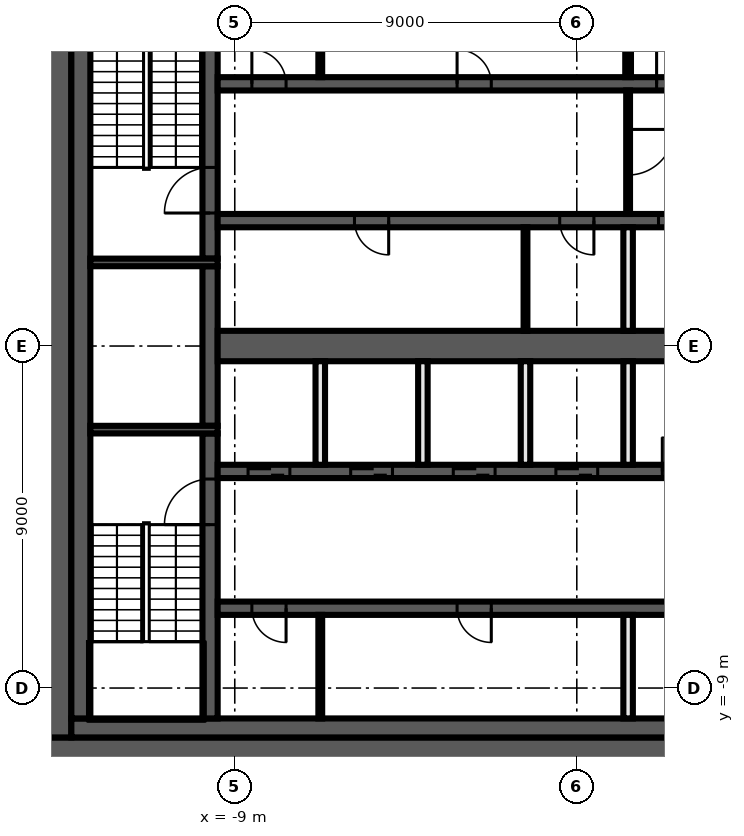
"""IFC4 building model, lengths in metres.
Left out: names, types, materials, properties, quantities, classifications, styles, units other than length and angle.
Written with IfcOpenShell. Run it as: python <this file> out.ifc"""

import sys

from ifc_helpers import new_model, si_unit, direction, frame, frame_2d, origin, place, context, subcontext, project, spatial, rectangle, extrude, element, fill, save


model = new_model("IFC4")
c1 = context("Model", 3, precision=1e-05, world=origin(), true_north=direction((0.0, 1.0)))
c2 = subcontext(c1, "Body", "Model", "MODEL_VIEW")
j1 = project(units=[si_unit("LENGTHUNIT", "METRE"), si_unit("PLANEANGLEUNIT", "RADIAN")], contexts=[c1])
p1 = place(None, origin())
s1 = spatial("IfcSite", under=j1, at=p1, CompositionType="ELEMENT")
p2 = place(p1, origin())
s2 = spatial("IfcBuilding", under=s1, at=p2, CompositionType="ELEMENT")
p3 = place(p2, frame((0.0, 0.0, 262.2)))
s3 = spatial("IfcBuildingStorey", under=s2, at=p3, CompositionType="ELEMENT", Elevation=262.2)
p4 = place(p3, frame((14.0, -10.65, 0.0), z_axis=(0.0, 0.0, 1.0), x_axis=(-1.0, 0.0, 0.0)))
e1 = element("IfcWall", 1, at=p4, inside=s3, PredefinedType="SHEAR", context=c2, shape_type="SweptSolid", body=[
    extrude(rectangle(XDim=28.0, YDim=0.7, at=frame_2d((14.0, 0.0))), origin(), (0.0, 0.0, 1.0), 3.82),
])
p5 = place(p4, frame((5.1, 0.0, 0.0)))
e2 = element("IfcOpeningElement", 2, at=p5, cuts=e1, PredefinedType="OPENING", context=c2, shape_type="SweptSolid", body=[
    extrude(rectangle(XDim=1.6, YDim=2.1, at=frame_2d((0.8, 1.05))), frame((0.0, 0.36, 0.0), z_axis=(0.0, -1.0, 0.0), x_axis=(1.0, 0.0, 0.0)), (0.0, 0.0, 1.0), 0.72),
])
p6 = place(p3, frame((-13.65, -10.3, 0.0), z_axis=(0.0, 0.0, 1.0), x_axis=(0.0, 1.0, 0.0)))
e3 = element("IfcWall", 3, at=p6, inside=s3, PredefinedType="SHEAR", context=c2, shape_type="SweptSolid", body=[
    extrude(rectangle(XDim=20.6, YDim=0.7, at=frame_2d((10.3, 0.0))), origin(), (0.0, 0.0, 1.0), 3.82),
])
p7 = place(p3, frame((6.9, -10.05, 0.0), z_axis=(0.0, 0.0, 1.0), x_axis=(-1.0, 0.0, 0.0)))
e4 = element("IfcWall", 4, at=p7, inside=s3, PredefinedType="SHEAR", context=c2, shape_type="SweptSolid", body=[
    extrude(rectangle(XDim=20.2, YDim=0.5, at=frame_2d((10.1, 0.0))), origin(), (0.0, 0.0, 1.0), 3.82),
])
p8 = place(p3, frame((-13.05, -9.8, 0.0), z_axis=(0.0, 0.0, 1.0), x_axis=(0.0, 1.0, 0.0)))
e5 = element("IfcWall", 5, at=p8, inside=s3, PredefinedType="SHEAR", context=c2, shape_type="SweptSolid", body=[
    extrude(rectangle(XDim=19.6, YDim=0.5, at=frame_2d((9.8, 0.0))), origin(), (0.0, 0.0, 1.0), 3.82),
])
p9 = place(p3, frame((-9.65, -9.8, 0.0), z_axis=(0.0, 0.0, 1.0), x_axis=(0.0, 1.0, 0.0)))
e6 = element("IfcWall", 6, at=p9, inside=s3, PredefinedType="SHEAR", context=c2, shape_type="SweptSolid", body=[
    extrude(rectangle(XDim=7.5, YDim=0.4, at=frame_2d((3.75, 0.0))), origin(), (0.0, 0.0, 1.0), 3.82),
])
p10 = place(p9, frame((5.1, 0.0, 0.0)))
e7 = element("IfcOpeningElement", 7, at=p10, cuts=e6, PredefinedType="OPENING", context=c2, shape_type="SweptSolid", body=[
    extrude(rectangle(XDim=1.2, YDim=2.1, at=frame_2d((0.6, 1.05))), frame((0.0, 0.21, 0.0), z_axis=(0.0, -1.0, 0.0), x_axis=(1.0, 0.0, 0.0)), (0.0, 0.0, 1.0), 0.42),
])
p11 = place(p3, frame((-9.65, -2.1, 0.0), z_axis=(0.0, 0.0, 1.0), x_axis=(0.0, 1.0, 0.0)))
e8 = element("IfcWall", 8, at=p11, inside=s3, PredefinedType="SHEAR", context=c2, shape_type="SweptSolid", body=[
    extrude(rectangle(XDim=4.2, YDim=0.4, at=frame_2d((2.1, 0.0))), origin(), (0.0, 0.0, 1.0), 3.82),
])
p12 = place(p3, frame((-9.65, 2.3, 0.0), z_axis=(0.0, 0.0, 1.0), x_axis=(0.0, 1.0, 0.0)))
e9 = element("IfcWall", 9, at=p12, inside=s3, PredefinedType="SHEAR", context=c2, shape_type="SweptSolid", body=[
    extrude(rectangle(XDim=7.5, YDim=0.4, at=frame_2d((3.75, 0.0))), origin(), (0.0, 0.0, 1.0), 3.82),
])
p13 = place(p12, frame((1.2, 0.0, 0.0)))
e10 = element("IfcOpeningElement", 10, at=p13, cuts=e9, PredefinedType="OPENING", context=c2, shape_type="SweptSolid", body=[
    extrude(rectangle(XDim=1.2, YDim=2.1, at=frame_2d((0.6, 1.05))), frame((0.0, 0.21, 0.0), z_axis=(0.0, -1.0, 0.0), x_axis=(1.0, 0.0, 0.0)), (0.0, 0.0, 1.0), 0.42),
])
for number, where, z_axis, x_axis in (
    (11, (-9.45, 2.2, 0.0), (0.0, 0.0, 1.0), (-1.0, 0.0, 0.0)),
    (12, (-9.45, -2.2, 0.0), (0.0, 0.0, 1.0), (-1.0, 0.0, 0.0)),
):
    element("IfcWall", number, at=place(p3, frame(where, z_axis=z_axis, x_axis=x_axis)), inside=s3, PredefinedType="SHEAR", context=c2, shape_type="SweptSolid", body=[
        extrude(rectangle(XDim=3.35, YDim=0.2, at=frame_2d((1.675, 0.0))), origin(), (0.0, 0.0, 1.0), 3.82),
    ])
p14 = place(p3, frame((-9.45, 6.9, 0.0), z_axis=(0.0, 0.0, 1.0), x_axis=(1.0, 0.0, 0.0)))
e13 = element("IfcWall", 13, at=p14, inside=s3, PredefinedType="SHEAR", context=c2, shape_type="SweptSolid", body=[
    extrude(rectangle(XDim=18.9, YDim=0.35, at=frame_2d((9.45, 0.0))), origin(), (0.0, 0.0, 1.0), 3.82),
])
p15 = place(p14, frame((11.55, 0.0, 0.0)))
e14 = element("IfcOpeningElement", 14, at=p15, cuts=e13, PredefinedType="OPENING", context=c2, shape_type="SweptSolid", body=[
    extrude(rectangle(XDim=1.2, YDim=2.1, at=frame_2d((0.6, 1.05))), frame((0.0, 0.185, 0.0), z_axis=(0.0, -1.0, 0.0), x_axis=(1.0, 0.0, 0.0)), (0.0, 0.0, 1.0), 0.37),
])
p16 = place(p14, frame((14.3, 0.0, 0.0)))
e15 = element("IfcOpeningElement", 15, at=p16, cuts=e13, PredefinedType="OPENING", context=c2, shape_type="SweptSolid", body=[
    extrude(rectangle(XDim=1.1, YDim=2.1, at=frame_2d((0.55, 1.05))), frame((0.0, 0.185, 0.0), z_axis=(0.0, -1.0, 0.0), x_axis=(1.0, 0.0, 0.0)), (0.0, 0.0, 1.0), 0.37),
])
p17 = place(p14, frame((17.0, 0.0, 0.0)))
e16 = element("IfcOpeningElement", 16, at=p17, cuts=e13, PredefinedType="OPENING", context=c2, shape_type="SweptSolid", body=[
    extrude(rectangle(XDim=1.1, YDim=2.1, at=frame_2d((0.55, 1.05))), frame((0.0, 0.185, 0.0), z_axis=(0.0, -1.0, 0.0), x_axis=(1.0, 0.0, 0.0)), (0.0, 0.0, 1.0), 0.37),
])
p18 = place(p14, frame((0.9, 0.0, 0.0)))
e17 = element("IfcOpeningElement", 17, at=p18, cuts=e13, PredefinedType="OPENING", context=c2, shape_type="SweptSolid", body=[
    extrude(rectangle(XDim=0.9, YDim=2.1, at=frame_2d((0.45, 1.05))), frame((0.0, 0.185, 0.0), z_axis=(0.0, -1.0, 0.0), x_axis=(1.0, 0.0, 0.0)), (0.0, 0.0, 1.0), 0.37),
])
p19 = place(p14, frame((6.3, 0.0, 0.0)))
e18 = element("IfcOpeningElement", 18, at=p19, cuts=e13, PredefinedType="OPENING", context=c2, shape_type="SweptSolid", body=[
    extrude(rectangle(XDim=0.9, YDim=2.1, at=frame_2d((0.45, 1.05))), frame((0.0, 0.185, 0.0), z_axis=(0.0, -1.0, 0.0), x_axis=(1.0, 0.0, 0.0)), (0.0, 0.0, 1.0), 0.37),
])
p20 = place(p3, frame((9.45, 3.3, 0.0), z_axis=(0.0, 0.0, 1.0), x_axis=(-1.0, 0.0, 0.0)))
e19 = element("IfcWall", 19, at=p20, inside=s3, PredefinedType="SHEAR", context=c2, shape_type="SweptSolid", body=[
    extrude(rectangle(XDim=18.9, YDim=0.35, at=frame_2d((9.45, 0.0))), origin(), (0.0, 0.0, 1.0), 3.82),
])
p21 = place(p20, frame((6.2, 0.0, 0.0)))
e20 = element("IfcOpeningElement", 20, at=p21, cuts=e19, PredefinedType="OPENING", context=c2, shape_type="SweptSolid", body=[
    extrude(rectangle(XDim=1.1, YDim=2.1, at=frame_2d((0.55, 1.05))), frame((0.0, 0.185, 0.0), z_axis=(0.0, -1.0, 0.0), x_axis=(1.0, 0.0, 0.0)), (0.0, 0.0, 1.0), 0.37),
])
p22 = place(p20, frame((3.5, 0.0, 0.0)))
e21 = element("IfcOpeningElement", 21, at=p22, cuts=e19, PredefinedType="OPENING", context=c2, shape_type="SweptSolid", body=[
    extrude(rectangle(XDim=1.1, YDim=2.1, at=frame_2d((0.55, 1.05))), frame((0.0, 0.185, 0.0), z_axis=(0.0, -1.0, 0.0), x_axis=(1.0, 0.0, 0.0)), (0.0, 0.0, 1.0), 0.37),
])
p23 = place(p20, frame((0.9, 0.0, 0.0)))
e22 = element("IfcOpeningElement", 22, at=p23, cuts=e19, PredefinedType="OPENING", context=c2, shape_type="SweptSolid", body=[
    extrude(rectangle(XDim=0.9, YDim=2.1, at=frame_2d((0.45, 1.05))), frame((0.0, 0.185, 0.0), z_axis=(0.0, -1.0, 0.0), x_axis=(1.0, 0.0, 0.0)), (0.0, 0.0, 1.0), 0.37),
])
p24 = place(p20, frame((14.4, 0.0, 0.0)))
e23 = element("IfcOpeningElement", 23, at=p24, cuts=e19, PredefinedType="OPENING", context=c2, shape_type="SweptSolid", body=[
    extrude(rectangle(XDim=0.9, YDim=2.1, at=frame_2d((0.45, 1.05))), frame((0.0, 0.185, 0.0), z_axis=(0.0, -1.0, 0.0), x_axis=(1.0, 0.0, 0.0)), (0.0, 0.0, 1.0), 0.37),
])
p25 = place(p20, frame((9.0, 0.0, 0.0)))
e24 = element("IfcOpeningElement", 24, at=p25, cuts=e19, PredefinedType="OPENING", context=c2, shape_type="SweptSolid", body=[
    extrude(rectangle(XDim=0.9, YDim=2.1, at=frame_2d((0.45, 1.05))), frame((0.0, 0.185, 0.0), z_axis=(0.0, -1.0, 0.0), x_axis=(1.0, 0.0, 0.0)), (0.0, 0.0, 1.0), 0.37),
])
p26 = place(p3, frame((-9.45, -3.3, 0.0), z_axis=(0.0, 0.0, 1.0), x_axis=(1.0, 0.0, 0.0)))
e25 = element("IfcWall", 25, at=p26, inside=s3, PredefinedType="SHEAR", context=c2, shape_type="SweptSolid", body=[
    extrude(rectangle(XDim=18.9, YDim=0.35, at=frame_2d((9.45, 0.0))), origin(), (0.0, 0.0, 1.0), 3.82),
])
p27 = place(p26, frame((0.8, 0.0, 0.0)))
e26 = element("IfcOpeningElement", 26, at=p27, cuts=e25, PredefinedType="OPENING", context=c2, shape_type="SweptSolid", body=[
    extrude(rectangle(XDim=1.1, YDim=2.1, at=frame_2d((0.55, 1.05))), frame((0.0, 0.185, 0.0), z_axis=(0.0, -1.0, 0.0), x_axis=(1.0, 0.0, 0.0)), (0.0, 0.0, 1.0), 0.37),
])
p28 = place(p26, frame((3.5, 0.0, 0.0)))
e27 = element("IfcOpeningElement", 27, at=p28, cuts=e25, PredefinedType="OPENING", context=c2, shape_type="SweptSolid", body=[
    extrude(rectangle(XDim=1.1, YDim=2.1, at=frame_2d((0.55, 1.05))), frame((0.0, 0.185, 0.0), z_axis=(0.0, -1.0, 0.0), x_axis=(1.0, 0.0, 0.0)), (0.0, 0.0, 1.0), 0.37),
])
p29 = place(p26, frame((6.2, 0.0, 0.0)))
e28 = element("IfcOpeningElement", 28, at=p29, cuts=e25, PredefinedType="OPENING", context=c2, shape_type="SweptSolid", body=[
    extrude(rectangle(XDim=1.1, YDim=2.1, at=frame_2d((0.55, 1.05))), frame((0.0, 0.185, 0.0), z_axis=(0.0, -1.0, 0.0), x_axis=(1.0, 0.0, 0.0)), (0.0, 0.0, 1.0), 0.37),
])
p30 = place(p26, frame((8.9, 0.0, 0.0)))
e29 = element("IfcOpeningElement", 29, at=p30, cuts=e25, PredefinedType="OPENING", context=c2, shape_type="SweptSolid", body=[
    extrude(rectangle(XDim=1.1, YDim=2.1, at=frame_2d((0.55, 1.05))), frame((0.0, 0.185, 0.0), z_axis=(0.0, -1.0, 0.0), x_axis=(1.0, 0.0, 0.0)), (0.0, 0.0, 1.0), 0.37),
])
p31 = place(p26, frame((17.0, 0.0, 0.0)))
e30 = element("IfcOpeningElement", 30, at=p31, cuts=e25, PredefinedType="OPENING", context=c2, shape_type="SweptSolid", body=[
    extrude(rectangle(XDim=1.1, YDim=2.1, at=frame_2d((0.55, 1.05))), frame((0.0, 0.185, 0.0), z_axis=(0.0, -1.0, 0.0), x_axis=(1.0, 0.0, 0.0)), (0.0, 0.0, 1.0), 0.37),
])
p32 = place(p26, frame((11.7, 0.0, 0.0)))
e31 = element("IfcOpeningElement", 31, at=p32, cuts=e25, PredefinedType="OPENING", context=c2, shape_type="SweptSolid", body=[
    extrude(rectangle(XDim=0.9, YDim=2.1, at=frame_2d((0.45, 1.05))), frame((0.0, 0.185, 0.0), z_axis=(0.0, -1.0, 0.0), x_axis=(1.0, 0.0, 0.0)), (0.0, 0.0, 1.0), 0.37),
])
p33 = place(p26, frame((14.4, 0.0, 0.0)))
e32 = element("IfcOpeningElement", 32, at=p33, cuts=e25, PredefinedType="OPENING", context=c2, shape_type="SweptSolid", body=[
    extrude(rectangle(XDim=0.9, YDim=2.1, at=frame_2d((0.45, 1.05))), frame((0.0, 0.185, 0.0), z_axis=(0.0, -1.0, 0.0), x_axis=(1.0, 0.0, 0.0)), (0.0, 0.0, 1.0), 0.37),
])
p34 = place(p3, frame((9.45, -6.9, 0.0), z_axis=(0.0, 0.0, 1.0), x_axis=(-1.0, 0.0, 0.0)))
e33 = element("IfcWall", 33, at=p34, inside=s3, PredefinedType="SHEAR", context=c2, shape_type="SweptSolid", body=[
    extrude(rectangle(XDim=18.9, YDim=0.35, at=frame_2d((9.45, 0.0))), origin(), (0.0, 0.0, 1.0), 3.82),
])
p35 = place(p34, frame((0.75, 0.0, 0.0)))
e34 = element("IfcOpeningElement", 34, at=p35, cuts=e33, PredefinedType="OPENING", context=c2, shape_type="SweptSolid", body=[
    extrude(rectangle(XDim=1.2, YDim=2.1, at=frame_2d((0.6, 1.05))), frame((0.0, 0.185, 0.0), z_axis=(0.0, -1.0, 0.0), x_axis=(1.0, 0.0, 0.0)), (0.0, 0.0, 1.0), 0.37),
])
p36 = place(p34, frame((17.1, 0.0, 0.0)))
e35 = element("IfcOpeningElement", 35, at=p36, cuts=e33, PredefinedType="OPENING", context=c2, shape_type="SweptSolid", body=[
    extrude(rectangle(XDim=0.9, YDim=2.1, at=frame_2d((0.45, 1.05))), frame((0.0, 0.185, 0.0), z_axis=(0.0, -1.0, 0.0), x_axis=(1.0, 0.0, 0.0)), (0.0, 0.0, 1.0), 0.37),
])
p37 = place(p34, frame((11.7, 0.0, 0.0)))
e36 = element("IfcOpeningElement", 36, at=p37, cuts=e33, PredefinedType="OPENING", context=c2, shape_type="SweptSolid", body=[
    extrude(rectangle(XDim=0.9, YDim=2.1, at=frame_2d((0.45, 1.05))), frame((0.0, 0.185, 0.0), z_axis=(0.0, -1.0, 0.0), x_axis=(1.0, 0.0, 0.0)), (0.0, 0.0, 1.0), 0.37),
])
p38 = place(p3, frame((-9.45, 0.0, 0.0), z_axis=(0.0, 0.0, 1.0), x_axis=(1.0, 0.0, 0.0)))
e37 = element("IfcWall", 37, at=p38, inside=s3, PredefinedType="SHEAR", context=c2, shape_type="SweptSolid", body=[
    extrude(rectangle(XDim=18.9, YDim=0.8, at=frame_2d((9.45, 0.0))), origin(), (0.0, 0.0, 1.0), 3.82),
])
p39 = place(p3, frame((1.35, 7.075, 0.0), z_axis=(0.0, 0.0, 1.0), x_axis=(0.0, 1.0, 0.0)))
e38 = element("IfcWall", 38, at=p39, inside=s3, PredefinedType="PARTITIONING", context=c2, shape_type="SweptSolid", body=[
    extrude(rectangle(XDim=2.725, YDim=0.15, at=frame_2d((1.363, 0.0))), origin(), (0.0, 0.0, 1.0), 3.82),
])
p40 = place(p3, frame((1.35, 6.725, 0.0), z_axis=(0.0, 0.0, 1.0), x_axis=(0.0, -1.0, 0.0)))
e39 = element("IfcWall", 39, at=p40, inside=s3, PredefinedType="PARTITIONING", context=c2, shape_type="SweptSolid", body=[
    extrude(rectangle(XDim=3.25, YDim=0.1, at=frame_2d((1.625, 0.0))), origin(), (0.0, 0.0, 1.0), 3.82),
])
p41 = place(p40, frame((1.025, 0.0, 0.0)))
e40 = element("IfcOpeningElement", 40, at=p41, cuts=e39, PredefinedType="OPENING", context=c2, shape_type="SweptSolid", body=[
    extrude(rectangle(XDim=1.2, YDim=2.1, at=frame_2d((0.6, 1.05))), frame((0.0, 0.06, 0.0), z_axis=(0.0, -1.0, 0.0), x_axis=(1.0, 0.0, 0.0)), (0.0, 0.0, 1.0), 0.12),
])
for number, where, z_axis, x_axis in (
    (41, (1.35, -9.8, 0.0), (0.0, 0.0, 1.0), (0.0, 1.0, 0.0)),
    (42, (1.35, -3.125, 0.0), (0.0, 0.0, 1.0), (0.0, 1.0, 0.0)),
    (43, (1.35, 0.4, 0.0), (0.0, 0.0, 1.0), (0.0, 1.0, 0.0)),
):
    element("IfcWall", number, at=place(p3, frame(where, z_axis=z_axis, x_axis=x_axis)), inside=s3, PredefinedType="SOLIDWALL", context=c2, shape_type="SweptSolid", body=[
        extrude(rectangle(XDim=2.725, YDim=0.25, at=frame_2d((1.363, 0.0))), origin(), (0.0, 0.0, 1.0), 3.82),
    ])
p42 = place(p3, frame((-1.35, 0.4, 0.0), z_axis=(0.0, 0.0, 1.0), x_axis=(0.0, 1.0, 0.0)))
e44 = element("IfcWall", 44, at=p42, inside=s3, PredefinedType="PARTITIONING", context=c2, shape_type="SweptSolid", body=[
    extrude(rectangle(XDim=2.725, YDim=0.1, at=frame_2d((1.363, 0.0))), origin(), (0.0, 0.0, 1.0), 3.82),
])
for number, where, z_axis, x_axis in (
    (45, (-1.35, -3.125, 0.0), (0.0, 0.0, 1.0), (0.0, 1.0, 0.0)),
    (46, (-4.05, -3.125, 0.0), (0.0, 0.0, 1.0), (0.0, 1.0, 0.0)),
):
    element("IfcWall", number, at=place(p3, frame(where, z_axis=z_axis, x_axis=x_axis)), inside=s3, PredefinedType="SOLIDWALL", context=c2, shape_type="SweptSolid", body=[
        extrude(rectangle(XDim=2.725, YDim=0.25, at=frame_2d((1.363, 0.0))), origin(), (0.0, 0.0, 1.0), 3.82),
    ])
for number, where, z_axis, x_axis in (
    (47, (-6.75, -9.8, 0.0), (0.0, 0.0, 1.0), (0.0, 1.0, 0.0)),
    (48, (-6.75, 7.075, 0.0), (0.0, 0.0, 1.0), (0.0, 1.0, 0.0)),
):
    element("IfcWall", number, at=place(p3, frame(where, z_axis=z_axis, x_axis=x_axis)), inside=s3, PredefinedType="PARTITIONING", context=c2, shape_type="SweptSolid", body=[
        extrude(rectangle(XDim=2.725, YDim=0.1, at=frame_2d((1.363, 0.0))), origin(), (0.0, 0.0, 1.0), 3.82),
    ])
p43 = place(p3, frame((-6.75, -3.125, 0.0), z_axis=(0.0, 0.0, 1.0), x_axis=(0.0, 1.0, 0.0)))
e49 = element("IfcWall", 49, at=p43, inside=s3, PredefinedType="SOLIDWALL", context=c2, shape_type="SweptSolid", body=[
    extrude(rectangle(XDim=2.725, YDim=0.25, at=frame_2d((1.363, 0.0))), origin(), (0.0, 0.0, 1.0), 3.82),
])
p44 = place(p15, origin())
e50 = element("IfcDoor", 50, at=p44, inside=s3, OperationType="SINGLE_SWING_LEFT", PredefinedType="DOOR", context=c2, shape_type="SweptSolid", body=[
    extrude(rectangle(XDim=1.2, YDim=2.1, at=frame_2d((0.6, 1.05))), frame((0.0, 0.025, 0.0), z_axis=(0.0, -1.0, 0.0), x_axis=(1.0, 0.0, 0.0)), (0.0, 0.0, 1.0), 0.05),
])
fill(e14, e50)
p45 = place(p21, origin())
e51 = element("IfcDoor", 51, at=p45, inside=s3, OperationType="DOUBLE_DOOR_SLIDING", PredefinedType="DOOR", context=c2, shape_type="SweptSolid", body=[
    extrude(rectangle(XDim=1.1, YDim=2.1, at=frame_2d((0.55, 1.05))), frame((0.0, 0.025, 0.0), z_axis=(0.0, -1.0, 0.0), x_axis=(1.0, 0.0, 0.0)), (0.0, 0.0, 1.0), 0.05),
])
fill(e20, e51)
p46 = place(p27, origin())
e52 = element("IfcDoor", 52, at=p46, inside=s3, OperationType="DOUBLE_DOOR_SLIDING", PredefinedType="DOOR", context=c2, shape_type="SweptSolid", body=[
    extrude(rectangle(XDim=1.1, YDim=2.1, at=frame_2d((0.55, 1.05))), frame((0.0, 0.025, 0.0), z_axis=(0.0, -1.0, 0.0), x_axis=(1.0, 0.0, 0.0)), (0.0, 0.0, 1.0), 0.05),
])
fill(e26, e52)
p47 = place(p28, origin())
e53 = element("IfcDoor", 53, at=p47, inside=s3, OperationType="DOUBLE_DOOR_SLIDING", PredefinedType="DOOR", context=c2, shape_type="SweptSolid", body=[
    extrude(rectangle(XDim=1.1, YDim=2.1, at=frame_2d((0.55, 1.05))), frame((0.0, 0.025, 0.0), z_axis=(0.0, -1.0, 0.0), x_axis=(1.0, 0.0, 0.0)), (0.0, 0.0, 1.0), 0.05),
])
fill(e27, e53)
p48 = place(p29, origin())
e54 = element("IfcDoor", 54, at=p48, inside=s3, OperationType="DOUBLE_DOOR_SLIDING", PredefinedType="DOOR", context=c2, shape_type="SweptSolid", body=[
    extrude(rectangle(XDim=1.1, YDim=2.1, at=frame_2d((0.55, 1.05))), frame((0.0, 0.025, 0.0), z_axis=(0.0, -1.0, 0.0), x_axis=(1.0, 0.0, 0.0)), (0.0, 0.0, 1.0), 0.05),
])
fill(e28, e54)
p49 = place(p30, origin())
e55 = element("IfcDoor", 55, at=p49, inside=s3, OperationType="DOUBLE_DOOR_SLIDING", PredefinedType="DOOR", context=c2, shape_type="SweptSolid", body=[
    extrude(rectangle(XDim=1.1, YDim=2.1, at=frame_2d((0.55, 1.05))), frame((0.0, 0.025, 0.0), z_axis=(0.0, -1.0, 0.0), x_axis=(1.0, 0.0, 0.0)), (0.0, 0.0, 1.0), 0.05),
])
fill(e29, e55)
p50 = place(p18, origin())
e56 = element("IfcDoor", 56, at=p50, inside=s3, OperationType="SINGLE_SWING_RIGHT", PredefinedType="DOOR", context=c2, shape_type="SweptSolid", body=[
    extrude(rectangle(XDim=0.9, YDim=2.1, at=frame_2d((0.45, 1.05))), frame((0.0, 0.025, 0.0), z_axis=(0.0, -1.0, 0.0), x_axis=(1.0, 0.0, 0.0)), (0.0, 0.0, 1.0), 0.05),
])
fill(e17, e56)
p51 = place(p19, origin())
e57 = element("IfcDoor", 57, at=p51, inside=s3, OperationType="SINGLE_SWING_LEFT", PredefinedType="DOOR", context=c2, shape_type="SweptSolid", body=[
    extrude(rectangle(XDim=0.9, YDim=2.1, at=frame_2d((0.45, 1.05))), frame((0.0, 0.025, 0.0), z_axis=(0.0, -1.0, 0.0), x_axis=(1.0, 0.0, 0.0)), (0.0, 0.0, 1.0), 0.05),
])
fill(e18, e57)
p52 = place(p24, origin())
e58 = element("IfcDoor", 58, at=p52, inside=s3, OperationType="SINGLE_SWING_RIGHT", PredefinedType="DOOR", context=c2, shape_type="SweptSolid", body=[
    extrude(rectangle(XDim=0.9, YDim=2.1, at=frame_2d((0.45, 1.05))), frame((0.0, 0.025, 0.0), z_axis=(0.0, -1.0, 0.0), x_axis=(1.0, 0.0, 0.0)), (0.0, 0.0, 1.0), 0.05),
])
fill(e23, e58)
p53 = place(p25, origin())
e59 = element("IfcDoor", 59, at=p53, inside=s3, OperationType="SINGLE_SWING_LEFT", PredefinedType="DOOR", context=c2, shape_type="SweptSolid", body=[
    extrude(rectangle(XDim=0.9, YDim=2.1, at=frame_2d((0.45, 1.05))), frame((0.0, 0.025, 0.0), z_axis=(0.0, -1.0, 0.0), x_axis=(1.0, 0.0, 0.0)), (0.0, 0.0, 1.0), 0.05),
])
fill(e24, e59)
p54 = place(p32, origin())
e60 = element("IfcDoor", 60, at=p54, inside=s3, OperationType="SINGLE_SWING_RIGHT", PredefinedType="DOOR", context=c2, shape_type="SweptSolid", body=[
    extrude(rectangle(XDim=0.9, YDim=2.1, at=frame_2d((0.45, 1.05))), frame((0.0, 0.025, 0.0), z_axis=(0.0, -1.0, 0.0), x_axis=(1.0, 0.0, 0.0)), (0.0, 0.0, 1.0), 0.05),
])
fill(e31, e60)
p55 = place(p36, origin())
e61 = element("IfcDoor", 61, at=p55, inside=s3, OperationType="SINGLE_SWING_RIGHT", PredefinedType="DOOR", context=c2, shape_type="SweptSolid", body=[
    extrude(rectangle(XDim=0.9, YDim=2.1, at=frame_2d((0.45, 1.05))), frame((0.0, 0.025, 0.0), z_axis=(0.0, -1.0, 0.0), x_axis=(1.0, 0.0, 0.0)), (0.0, 0.0, 1.0), 0.05),
])
fill(e35, e61)
p56 = place(p37, origin())
e62 = element("IfcDoor", 62, at=p56, inside=s3, OperationType="SINGLE_SWING_LEFT", PredefinedType="DOOR", context=c2, shape_type="SweptSolid", body=[
    extrude(rectangle(XDim=0.9, YDim=2.1, at=frame_2d((0.45, 1.05))), frame((0.0, 0.025, 0.0), z_axis=(0.0, -1.0, 0.0), x_axis=(1.0, 0.0, 0.0)), (0.0, 0.0, 1.0), 0.05),
])
fill(e36, e62)
p57 = place(p13, origin())
e63 = element("IfcDoor", 63, at=p57, inside=s3, OperationType="SINGLE_SWING_RIGHT", PredefinedType="DOOR", context=c2, shape_type="SweptSolid", body=[
    extrude(rectangle(XDim=1.2, YDim=2.1, at=frame_2d((0.6, 1.05))), frame((0.0, 0.025, 0.0), z_axis=(0.0, -1.0, 0.0), x_axis=(1.0, 0.0, 0.0)), (0.0, 0.0, 1.0), 0.05),
])
fill(e10, e63)
p58 = place(p10, origin())
e64 = element("IfcDoor", 64, at=p58, inside=s3, OperationType="SINGLE_SWING_LEFT", PredefinedType="DOOR", context=c2, shape_type="SweptSolid", body=[
    extrude(rectangle(XDim=1.2, YDim=2.1, at=frame_2d((0.6, 1.05))), frame((0.0, 0.025, 0.0), z_axis=(0.0, -1.0, 0.0), x_axis=(1.0, 0.0, 0.0)), (0.0, 0.0, 1.0), 0.05),
])
fill(e7, e64)
p59 = place(p41, origin())
e65 = element("IfcDoor", 65, at=p59, inside=s3, OperationType="SINGLE_SWING_LEFT", PredefinedType="DOOR", context=c2, shape_type="SweptSolid", body=[
    extrude(rectangle(XDim=1.2, YDim=2.1, at=frame_2d((0.6, 1.05))), frame((0.0, 0.025, 0.0), z_axis=(0.0, -1.0, 0.0), x_axis=(1.0, 0.0, 0.0)), (0.0, 0.0, 1.0), 0.05),
])
fill(e40, e65)
save(model, sys.argv[1])
